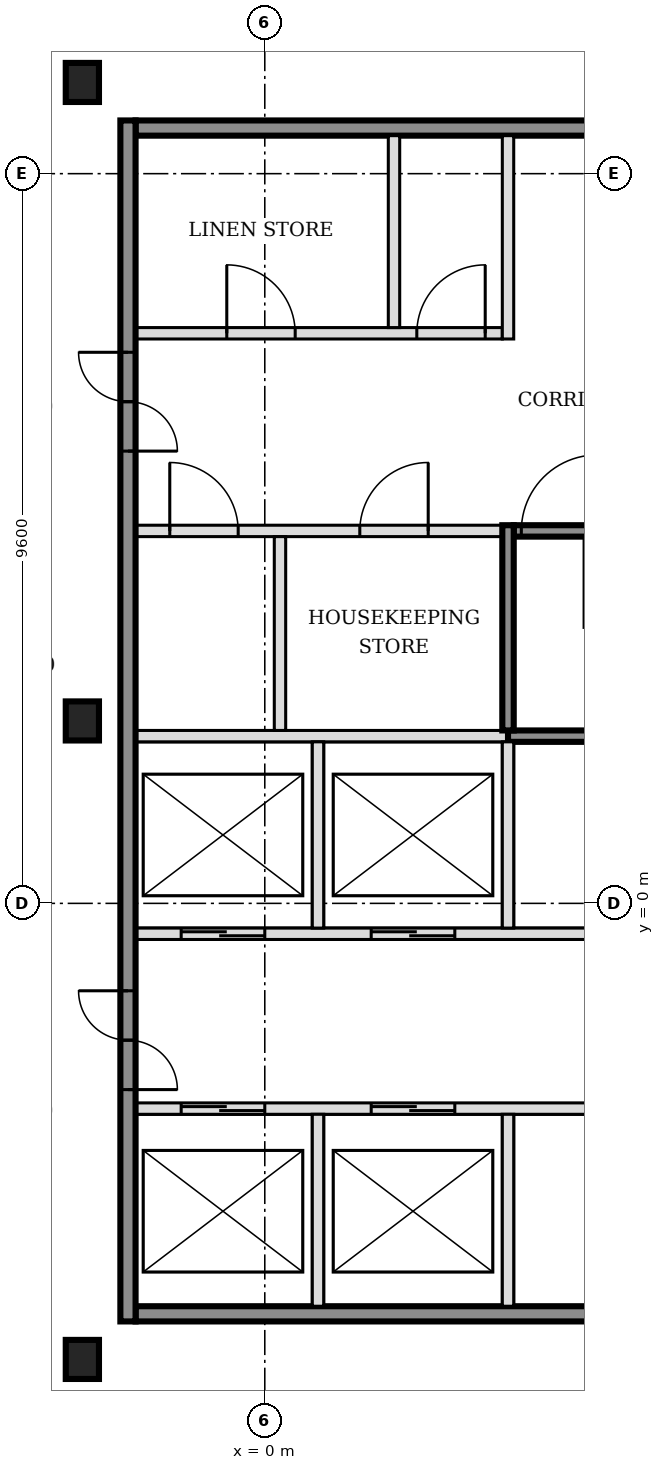
"""IFC4 building model, lengths in metres.
Left out: names, types, materials, properties, quantities, classifications, styles, units other than length and angle.
Written with IfcOpenShell. Run it as: python <this file> out.ifc"""

import sys

from ifc_helpers import new_model, si_unit, direction, frame, frame_2d, origin, origin_2d, place, context, subcontext, project, spatial, rectangle, i_section, extrude, element, fill, save


model = new_model("IFC4")
c1 = context("Model", 3, precision=1e-05, world=origin(), true_north=direction((0.0, 1.0)))
c2 = subcontext(c1, "Body", "Model", "MODEL_VIEW")
j1 = project(units=[si_unit("LENGTHUNIT", "METRE"), si_unit("PLANEANGLEUNIT", "RADIAN")], contexts=[c1])
p1 = place(None, origin())
s1 = spatial("IfcSite", under=j1, at=p1, CompositionType="ELEMENT")
p2 = place(p1, origin())
s2 = spatial("IfcBuilding", under=s1, at=p2, CompositionType="ELEMENT")
p3 = place(p2, frame((0.0, 0.0, 97.8)))
s3 = spatial("IfcBuildingStorey", under=s2, at=p3, CompositionType="ELEMENT", Elevation=97.8)
for number, where, z_axis, x_axis in (
    (1, (-2.4, -6.0, -0.15), (0.0, 0.0, 1.0), (1.0, 0.0, 0.0)),
    (2, (-2.4, 2.4, -0.15), (0.0, 0.0, 1.0), (1.0, 0.0, 0.0)),
    (3, (-2.4, 10.8, -0.15), (0.0, 0.0, 1.0), (1.0, 0.0, 0.0)),
):
    element("IfcColumn", number, at=place(p3, frame(where, z_axis=z_axis, x_axis=x_axis)), inside=s3, PredefinedType="COLUMN", context=c2, shape_type="SweptSolid", body=[
        extrude(i_section(OverallWidth=0.437, OverallDepth=0.514, WebThickness=0.061, FlangeThickness=0.097, FilletRadius=0.015, at=origin_2d()), origin(), (0.0, 0.0, 1.0), 3.6),
    ])
p4 = place(p3, frame((-1.7, -5.4, 0.0), z_axis=(0.0, 0.0, 1.0), x_axis=(1.0, 0.0, 0.0)))
e4 = element("IfcWall", 4, at=p4, inside=s3, PredefinedType="SOLIDWALL", context=c2, shape_type="SweptSolid", body=[
    extrude(rectangle(XDim=7.9, YDim=0.2, at=frame_2d((3.95, 0.0))), origin(), (0.0, 0.0, 1.0), 3.45),
])
p5 = place(p3, frame((-1.7, -2.7, 0.0), z_axis=(0.0, 0.0, 1.0), x_axis=(1.0, 0.0, 0.0)))
e5 = element("IfcWall", 5, at=p5, inside=s3, PredefinedType="SOLIDWALL", context=c2, shape_type="SweptSolid", body=[
    extrude(rectangle(XDim=7.9, YDim=0.15, at=frame_2d((3.95, 0.0))), origin(), (0.0, 0.0, 1.0), 3.45),
])
p6 = place(p5, frame((0.6, 0.0, 0.0)))
e6 = element("IfcOpeningElement", 6, at=p6, cuts=e5, PredefinedType="OPENING", context=c2, shape_type="SweptSolid", body=[
    extrude(rectangle(XDim=1.1, YDim=2.1, at=frame_2d((0.55, 1.05))), frame((0.0, 0.085, 0.0), z_axis=(0.0, -1.0, 0.0), x_axis=(1.0, 0.0, 0.0)), (0.0, 0.0, 1.0), 0.17),
])
p7 = place(p5, frame((3.1, 0.0, 0.0)))
e7 = element("IfcOpeningElement", 7, at=p7, cuts=e5, PredefinedType="OPENING", context=c2, shape_type="SweptSolid", body=[
    extrude(rectangle(XDim=1.1, YDim=2.1, at=frame_2d((0.55, 1.05))), frame((0.0, 0.085, 0.0), z_axis=(0.0, -1.0, 0.0), x_axis=(1.0, 0.0, 0.0)), (0.0, 0.0, 1.0), 0.17),
])
p8 = place(p3, frame((-1.7, -0.4, 0.0), z_axis=(0.0, 0.0, 1.0), x_axis=(1.0, 0.0, 0.0)))
e8 = element("IfcWall", 8, at=p8, inside=s3, PredefinedType="SOLIDWALL", context=c2, shape_type="SweptSolid", body=[
    extrude(rectangle(XDim=15.925, YDim=0.15, at=frame_2d((7.962, 0.0))), origin(), (0.0, 0.0, 1.0), 3.45),
])
p9 = place(p8, frame((0.6, 0.0, 0.0)))
e9 = element("IfcOpeningElement", 9, at=p9, cuts=e8, PredefinedType="OPENING", context=c2, shape_type="SweptSolid", body=[
    extrude(rectangle(XDim=1.1, YDim=2.1, at=frame_2d((0.55, 1.05))), frame((0.0, 0.085, 0.0), z_axis=(0.0, -1.0, 0.0), x_axis=(1.0, 0.0, 0.0)), (0.0, 0.0, 1.0), 0.17),
])
p10 = place(p8, frame((3.1, 0.0, 0.0)))
e10 = element("IfcOpeningElement", 10, at=p10, cuts=e8, PredefinedType="OPENING", context=c2, shape_type="SweptSolid", body=[
    extrude(rectangle(XDim=1.1, YDim=2.1, at=frame_2d((0.55, 1.05))), frame((0.0, 0.085, 0.0), z_axis=(0.0, -1.0, 0.0), x_axis=(1.0, 0.0, 0.0)), (0.0, 0.0, 1.0), 0.17),
])
p11 = place(p8, frame((11.575, 0.0, 0.0)))
e11 = element("IfcOpeningElement", 11, at=p11, cuts=e8, PredefinedType="OPENING", context=c2, shape_type="SweptSolid", body=[
    extrude(rectangle(XDim=1.2, YDim=2.1, at=frame_2d((0.6, 1.05))), frame((0.0, 0.085, 0.0), z_axis=(0.0, -1.0, 0.0), x_axis=(1.0, 0.0, 0.0)), (0.0, 0.0, 1.0), 0.17),
])
p12 = place(p8, frame((14.125, 0.0, 0.0)))
e12 = element("IfcOpeningElement", 12, at=p12, cuts=e8, PredefinedType="OPENING", context=c2, shape_type="SweptSolid", body=[
    extrude(rectangle(XDim=1.2, YDim=2.1, at=frame_2d((0.6, 1.05))), frame((0.0, 0.085, 0.0), z_axis=(0.0, -1.0, 0.0), x_axis=(1.0, 0.0, 0.0)), (0.0, 0.0, 1.0), 0.17),
])
p13 = place(p3, frame((-1.7, 2.2, 0.0), z_axis=(0.0, 0.0, 1.0), x_axis=(1.0, 0.0, 0.0)))
e13 = element("IfcWall", 13, at=p13, inside=s3, PredefinedType="SOLIDWALL", context=c2, shape_type="SweptSolid", body=[
    extrude(rectangle(XDim=4.9, YDim=0.15, at=frame_2d((2.45, 0.0))), origin(), (0.0, 0.0, 1.0), 3.45),
])
p14 = place(p3, frame((3.2, 2.2, 0.0), z_axis=(0.0, 0.0, 1.0), x_axis=(1.0, 0.0, 0.0)))
e14 = element("IfcWall", 14, at=p14, inside=s3, PredefinedType="SOLIDWALL", context=c2, shape_type="SweptSolid", body=[
    extrude(rectangle(XDim=6.5, YDim=0.15, at=frame_2d((3.25, 0.0))), origin(), (0.0, 0.0, 1.0), 3.45),
])
p15 = place(p3, frame((-1.7, 4.9, 0.0), z_axis=(0.0, 0.0, 1.0), x_axis=(1.0, 0.0, 0.0)))
e15 = element("IfcWall", 15, at=p15, inside=s3, PredefinedType="PARTITIONING", context=c2, shape_type="SweptSolid", body=[
    extrude(rectangle(XDim=4.825, YDim=0.15, at=frame_2d((2.413, 0.0))), origin(), (0.0, 0.0, 1.0), 3.45),
])
p16 = place(p15, frame((0.45, 0.0, 0.0)))
e16 = element("IfcOpeningElement", 16, at=p16, cuts=e15, PredefinedType="OPENING", context=c2, shape_type="SweptSolid", body=[
    extrude(rectangle(XDim=0.9, YDim=2.1, at=frame_2d((0.45, 1.05))), frame((0.0, 0.085, 0.0), z_axis=(0.0, -1.0, 0.0), x_axis=(1.0, 0.0, 0.0)), (0.0, 0.0, 1.0), 0.17),
])
p17 = place(p15, frame((2.95, 0.0, 0.0)))
e17 = element("IfcOpeningElement", 17, at=p17, cuts=e15, PredefinedType="OPENING", context=c2, shape_type="SweptSolid", body=[
    extrude(rectangle(XDim=0.9, YDim=2.1, at=frame_2d((0.45, 1.05))), frame((0.0, 0.085, 0.0), z_axis=(0.0, -1.0, 0.0), x_axis=(1.0, 0.0, 0.0)), (0.0, 0.0, 1.0), 0.17),
])
p18 = place(p3, frame((3.275, 4.9, 0.0), z_axis=(0.0, 0.0, 1.0), x_axis=(1.0, 0.0, 0.0)))
e18 = element("IfcWall", 18, at=p18, inside=s3, PredefinedType="SOLIDWALL", context=c2, shape_type="SweptSolid", body=[
    extrude(rectangle(XDim=6.425, YDim=0.15, at=frame_2d((3.212, 0.0))), origin(), (0.0, 0.0, 1.0), 3.45),
])
p19 = place(p18, frame((0.1, 0.0, 0.0)))
e19 = element("IfcOpeningElement", 19, at=p19, cuts=e18, PredefinedType="OPENING", context=c2, shape_type="SweptSolid", body=[
    extrude(rectangle(XDim=1.0, YDim=2.1, at=frame_2d((0.5, 1.05))), frame((0.0, 0.085, 0.0), z_axis=(0.0, -1.0, 0.0), x_axis=(1.0, 0.0, 0.0)), (0.0, 0.0, 1.0), 0.17),
])
p20 = place(p3, frame((-1.7, 7.5, 0.0), z_axis=(0.0, 0.0, 1.0), x_axis=(1.0, 0.0, 0.0)))
e20 = element("IfcWall", 20, at=p20, inside=s3, PredefinedType="PARTITIONING", context=c2, shape_type="SweptSolid", body=[
    extrude(rectangle(XDim=4.825, YDim=0.15, at=frame_2d((2.413, 0.0))), origin(), (0.0, 0.0, 1.0), 3.45),
])
p21 = place(p20, frame((1.2, 0.0, 0.0)))
e21 = element("IfcOpeningElement", 21, at=p21, cuts=e20, PredefinedType="OPENING", context=c2, shape_type="SweptSolid", body=[
    extrude(rectangle(XDim=0.9, YDim=2.1, at=frame_2d((0.45, 1.05))), frame((0.0, 0.085, 0.0), z_axis=(0.0, -1.0, 0.0), x_axis=(1.0, 0.0, 0.0)), (0.0, 0.0, 1.0), 0.17),
])
p22 = place(p20, frame((3.7, 0.0, 0.0)))
e22 = element("IfcOpeningElement", 22, at=p22, cuts=e20, PredefinedType="OPENING", context=c2, shape_type="SweptSolid", body=[
    extrude(rectangle(XDim=0.9, YDim=2.1, at=frame_2d((0.45, 1.05))), frame((0.0, 0.085, 0.0), z_axis=(0.0, -1.0, 0.0), x_axis=(1.0, 0.0, 0.0)), (0.0, 0.0, 1.0), 0.17),
])
p23 = place(p3, frame((-1.7, 10.2, 0.0), z_axis=(0.0, 0.0, 1.0), x_axis=(1.0, 0.0, 0.0)))
e23 = element("IfcWall", 23, at=p23, inside=s3, PredefinedType="SOLIDWALL", context=c2, shape_type="SweptSolid", body=[
    extrude(rectangle(XDim=7.9, YDim=0.2, at=frame_2d((3.95, 0.0))), origin(), (0.0, 0.0, 1.0), 3.45),
])
p24 = place(p3, frame((-1.8, -5.5, 0.0), z_axis=(0.0, 0.0, 1.0), x_axis=(0.0, 1.0, 0.0)))
e24 = element("IfcWall", 24, at=p24, inside=s3, PredefinedType="SOLIDWALL", context=c2, shape_type="SweptSolid", body=[
    extrude(rectangle(XDim=15.8, YDim=0.2, at=frame_2d((7.9, 0.0))), origin(), (0.0, 0.0, 1.0), 3.45),
])
p25 = place(p24, frame((3.05, 0.0, 0.0)))
e25 = element("IfcOpeningElement", 25, at=p25, cuts=e24, PredefinedType="OPENING", context=c2, shape_type="SweptSolid", body=[
    extrude(rectangle(XDim=1.3, YDim=2.1, at=frame_2d((0.65, 1.05))), frame((0.0, 0.11, 0.0), z_axis=(0.0, -1.0, 0.0), x_axis=(1.0, 0.0, 0.0)), (0.0, 0.0, 1.0), 0.22),
])
p26 = place(p24, frame((11.45, 0.0, 0.0)))
e26 = element("IfcOpeningElement", 26, at=p26, cuts=e24, PredefinedType="OPENING", context=c2, shape_type="SweptSolid", body=[
    extrude(rectangle(XDim=1.3, YDim=2.1, at=frame_2d((0.65, 1.05))), frame((0.0, 0.11, 0.0), z_axis=(0.0, -1.0, 0.0), x_axis=(1.0, 0.0, 0.0)), (0.0, 0.0, 1.0), 0.22),
])
p27 = place(p3, frame((0.2, 2.275, 0.0), z_axis=(0.0, 0.0, 1.0), x_axis=(0.0, 1.0, 0.0)))
e27 = element("IfcWall", 27, at=p27, inside=s3, PredefinedType="PARTITIONING", context=c2, shape_type="SweptSolid", body=[
    extrude(rectangle(XDim=2.55, YDim=0.15, at=frame_2d((1.275, 0.0))), origin(), (0.0, 0.0, 1.0), 3.45),
])
p28 = place(p3, frame((0.7, -5.3, 0.0), z_axis=(0.0, 0.0, 1.0), x_axis=(0.0, 1.0, 0.0)))
e28 = element("IfcWall", 28, at=p28, inside=s3, PredefinedType="SOLIDWALL", context=c2, shape_type="SweptSolid", body=[
    extrude(rectangle(XDim=2.525, YDim=0.15, at=frame_2d((1.263, 0.0))), origin(), (0.0, 0.0, 1.0), 3.45),
])
p29 = place(p3, frame((0.7, -0.325, 0.0), z_axis=(0.0, 0.0, 1.0), x_axis=(0.0, 1.0, 0.0)))
e29 = element("IfcWall", 29, at=p29, inside=s3, PredefinedType="SOLIDWALL", context=c2, shape_type="SweptSolid", body=[
    extrude(rectangle(XDim=2.45, YDim=0.15, at=frame_2d((1.225, 0.0))), origin(), (0.0, 0.0, 1.0), 3.45),
])
p30 = place(p3, frame((1.7, 7.575, 0.0), z_axis=(0.0, 0.0, 1.0), x_axis=(0.0, 1.0, 0.0)))
e30 = element("IfcWall", 30, at=p30, inside=s3, PredefinedType="PARTITIONING", context=c2, shape_type="SweptSolid", body=[
    extrude(rectangle(XDim=2.525, YDim=0.15, at=frame_2d((1.263, 0.0))), origin(), (0.0, 0.0, 1.0), 3.45),
])
p31 = place(p3, frame((3.2, -5.3, 0.0), z_axis=(0.0, 0.0, 1.0), x_axis=(0.0, 1.0, 0.0)))
e31 = element("IfcWall", 31, at=p31, inside=s3, PredefinedType="SOLIDWALL", context=c2, shape_type="SweptSolid", body=[
    extrude(rectangle(XDim=2.525, YDim=0.15, at=frame_2d((1.263, 0.0))), origin(), (0.0, 0.0, 1.0), 3.45),
])
p32 = place(p3, frame((3.2, -0.325, 0.0), z_axis=(0.0, 0.0, 1.0), x_axis=(0.0, 1.0, 0.0)))
e32 = element("IfcWall", 32, at=p32, inside=s3, PredefinedType="SOLIDWALL", context=c2, shape_type="SweptSolid", body=[
    extrude(rectangle(XDim=2.45, YDim=0.15, at=frame_2d((1.225, 0.0))), origin(), (0.0, 0.0, 1.0), 3.45),
])
p33 = place(p3, frame((3.2, 2.275, 0.0), z_axis=(0.0, 0.0, 1.0), x_axis=(0.0, 1.0, 0.0)))
e33 = element("IfcWall", 33, at=p33, inside=s3, PredefinedType="SOLIDWALL", context=c2, shape_type="SweptSolid", body=[
    extrude(rectangle(XDim=2.7, YDim=0.15, at=frame_2d((1.35, 0.0))), origin(), (0.0, 0.0, 1.0), 3.45),
])
p34 = place(p3, frame((3.2, 7.425, 0.0), z_axis=(0.0, 0.0, 1.0), x_axis=(0.0, 1.0, 0.0)))
e34 = element("IfcWall", 34, at=p34, inside=s3, PredefinedType="PARTITIONING", context=c2, shape_type="SweptSolid", body=[
    extrude(rectangle(XDim=2.675, YDim=0.15, at=frame_2d((1.337, 0.0))), origin(), (0.0, 0.0, 1.0), 3.45),
])
p35 = place(p6, origin())
e35 = element("IfcDoor", 35, at=p35, inside=s3, OperationType="DOUBLE_DOOR_SLIDING", PredefinedType="DOOR", context=c2, shape_type="SweptSolid", body=[
    extrude(rectangle(XDim=1.1, YDim=2.1, at=frame_2d((0.55, 1.05))), frame((0.0, 0.025, 0.0), z_axis=(0.0, -1.0, 0.0), x_axis=(1.0, 0.0, 0.0)), (0.0, 0.0, 1.0), 0.05),
])
fill(e6, e35)
p36 = place(p7, origin())
e36 = element("IfcDoor", 36, at=p36, inside=s3, OperationType="DOUBLE_DOOR_SLIDING", PredefinedType="DOOR", context=c2, shape_type="SweptSolid", body=[
    extrude(rectangle(XDim=1.1, YDim=2.1, at=frame_2d((0.55, 1.05))), frame((0.0, 0.025, 0.0), z_axis=(0.0, -1.0, 0.0), x_axis=(1.0, 0.0, 0.0)), (0.0, 0.0, 1.0), 0.05),
])
fill(e7, e36)
p37 = place(p9, origin())
e37 = element("IfcDoor", 37, at=p37, inside=s3, OperationType="DOUBLE_DOOR_SLIDING", PredefinedType="DOOR", context=c2, shape_type="SweptSolid", body=[
    extrude(rectangle(XDim=1.1, YDim=2.1, at=frame_2d((0.55, 1.05))), frame((0.0, 0.025, 0.0), z_axis=(0.0, -1.0, 0.0), x_axis=(1.0, 0.0, 0.0)), (0.0, 0.0, 1.0), 0.05),
])
fill(e9, e37)
p38 = place(p10, origin())
e38 = element("IfcDoor", 38, at=p38, inside=s3, OperationType="DOUBLE_DOOR_SLIDING", PredefinedType="DOOR", context=c2, shape_type="SweptSolid", body=[
    extrude(rectangle(XDim=1.1, YDim=2.1, at=frame_2d((0.55, 1.05))), frame((0.0, 0.025, 0.0), z_axis=(0.0, -1.0, 0.0), x_axis=(1.0, 0.0, 0.0)), (0.0, 0.0, 1.0), 0.05),
])
fill(e10, e38)
p39 = place(p19, origin())
e39 = element("IfcDoor", 39, at=p39, inside=s3, OperationType="SINGLE_SWING_RIGHT", PredefinedType="DOOR", context=c2, shape_type="SweptSolid", body=[
    extrude(rectangle(XDim=1.0, YDim=2.1, at=frame_2d((0.5, 1.05))), frame((0.0, 0.025, 0.0), z_axis=(0.0, -1.0, 0.0), x_axis=(1.0, 0.0, 0.0)), (0.0, 0.0, 1.0), 0.05),
])
fill(e19, e39)
p40 = place(p25, origin())
e40 = element("IfcDoor", 40, at=p40, inside=s3, OperationType="DOUBLE_DOOR_SINGLE_SWING", PredefinedType="DOOR", context=c2, shape_type="SweptSolid", body=[
    extrude(rectangle(XDim=1.3, YDim=2.1, at=frame_2d((0.65, 1.05))), frame((0.0, 0.025, 0.0), z_axis=(0.0, -1.0, 0.0), x_axis=(1.0, 0.0, 0.0)), (0.0, 0.0, 1.0), 0.05),
])
fill(e25, e40)
p41 = place(p26, origin())
e41 = element("IfcDoor", 41, at=p41, inside=s3, OperationType="DOUBLE_DOOR_SINGLE_SWING", PredefinedType="DOOR", context=c2, shape_type="SweptSolid", body=[
    extrude(rectangle(XDim=1.3, YDim=2.1, at=frame_2d((0.65, 1.05))), frame((0.0, 0.025, 0.0), z_axis=(0.0, -1.0, 0.0), x_axis=(1.0, 0.0, 0.0)), (0.0, 0.0, 1.0), 0.05),
])
fill(e26, e41)
p42 = place(p16, origin())
e42 = element("IfcDoor", 42, at=p42, inside=s3, OperationType="SINGLE_SWING_LEFT", PredefinedType="DOOR", context=c2, shape_type="SweptSolid", body=[
    extrude(rectangle(XDim=0.9, YDim=2.1, at=frame_2d((0.45, 1.05))), frame((0.0, 0.025, 0.0), z_axis=(0.0, -1.0, 0.0), x_axis=(1.0, 0.0, 0.0)), (0.0, 0.0, 1.0), 0.05),
])
fill(e16, e42)
p43 = place(p17, origin())
e43 = element("IfcDoor", 43, at=p43, inside=s3, OperationType="SINGLE_SWING_RIGHT", PredefinedType="DOOR", context=c2, shape_type="SweptSolid", body=[
    extrude(rectangle(XDim=0.9, YDim=2.1, at=frame_2d((0.45, 1.05))), frame((0.0, 0.025, 0.0), z_axis=(0.0, -1.0, 0.0), x_axis=(1.0, 0.0, 0.0)), (0.0, 0.0, 1.0), 0.05),
])
fill(e17, e43)
p44 = place(p21, origin())
e44 = element("IfcDoor", 44, at=p44, inside=s3, OperationType="SINGLE_SWING_LEFT", PredefinedType="DOOR", context=c2, shape_type="SweptSolid", body=[
    extrude(rectangle(XDim=0.9, YDim=2.1, at=frame_2d((0.45, 1.05))), frame((0.0, 0.025, 0.0), z_axis=(0.0, -1.0, 0.0), x_axis=(1.0, 0.0, 0.0)), (0.0, 0.0, 1.0), 0.05),
])
fill(e21, e44)
p45 = place(p22, origin())
e45 = element("IfcDoor", 45, at=p45, inside=s3, OperationType="SINGLE_SWING_RIGHT", PredefinedType="DOOR", context=c2, shape_type="SweptSolid", body=[
    extrude(rectangle(XDim=0.9, YDim=2.1, at=frame_2d((0.45, 1.05))), frame((0.0, 0.025, 0.0), z_axis=(0.0, -1.0, 0.0), x_axis=(1.0, 0.0, 0.0)), (0.0, 0.0, 1.0), 0.05),
])
fill(e22, e45)
save(model, sys.argv[1])
